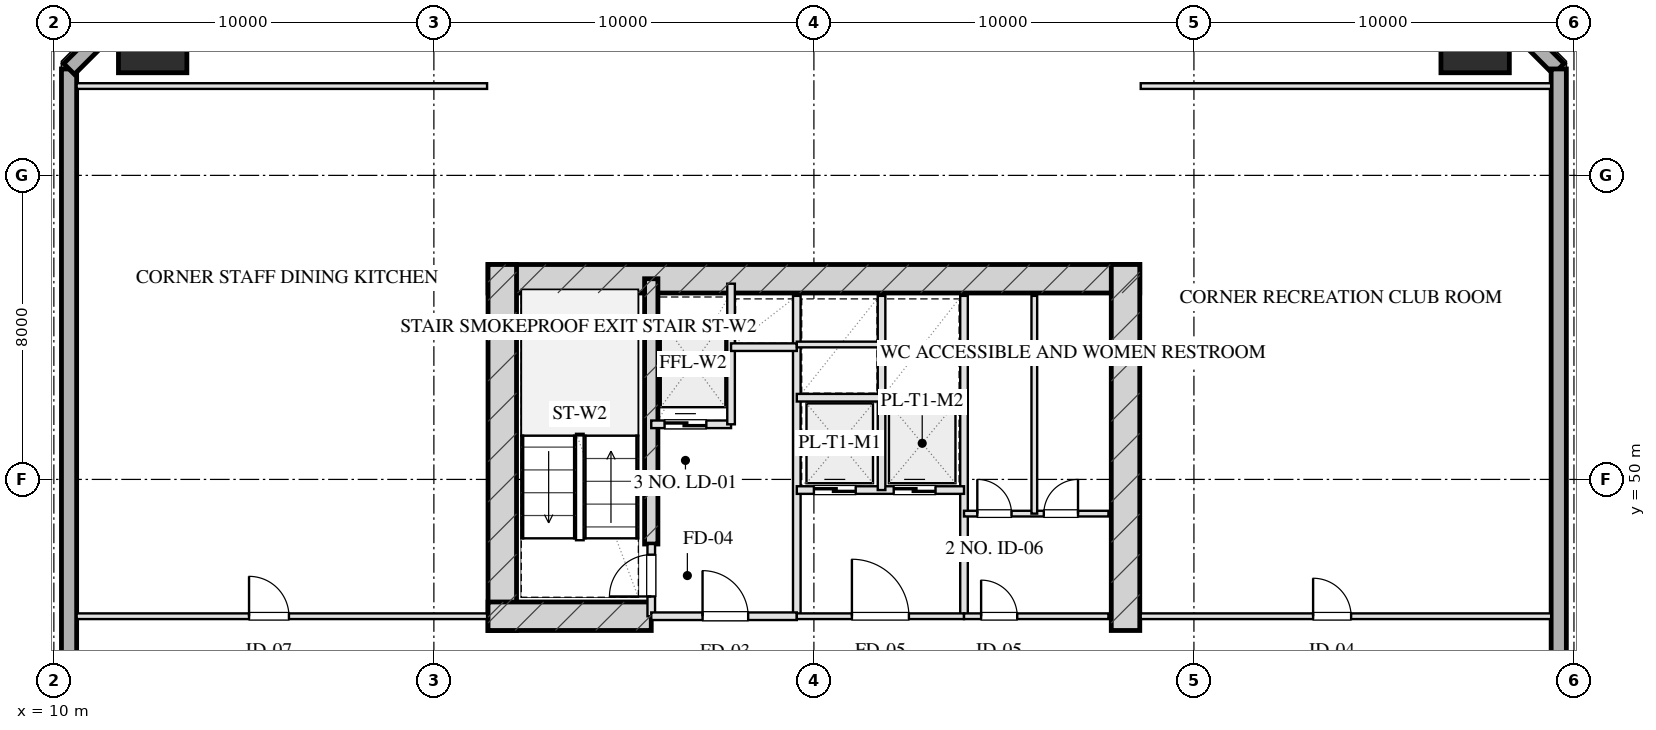
"""IFC4 building model, lengths in metres.
Left out: names, types, materials, properties, quantities, classifications, styles, units other than length and angle.
Written with IfcOpenShell. Run it as: python <this file> out.ifc"""

import sys

from ifc_helpers import new_model, si_unit, direction, frame, frame_2d, origin, origin_2d, place, context, subcontext, project, spatial, rectangle, hollow_rectangle, extrude, element, fill, save


model = new_model("IFC4")
c1 = context("Model", 3, precision=1e-05, world=origin(), true_north=direction((0.0, 1.0)))
c2 = subcontext(c1, "Body", "Model", "MODEL_VIEW")
j1 = project(units=[si_unit("LENGTHUNIT", "METRE"), si_unit("PLANEANGLEUNIT", "RADIAN")], contexts=[c1])
p1 = place(None, origin())
s1 = spatial("IfcSite", under=j1, at=p1, CompositionType="ELEMENT")
p2 = place(p1, origin())
s2 = spatial("IfcBuilding", under=s1, at=p2, CompositionType="ELEMENT")
p3 = place(p2, frame((0.0, 0.0, 64.4)))
s3 = spatial("IfcBuildingStorey", under=s2, at=p3, CompositionType="ELEMENT", Elevation=64.4)
p4 = place(p3, frame((21.425, 55.28, 0.0), z_axis=(0.0, 0.0, 1.0), x_axis=(1.0, 0.0, 0.0)))
e1 = element("IfcWall", 1, at=p4, inside=s3, PredefinedType="SHEAR", context=c2, shape_type="SweptSolid", body=[
    extrude(rectangle(XDim=17.15, YDim=0.75, at=frame_2d((8.575, 0.0))), origin(), (0.0, 0.0, 1.0), 3.45),
])
for number, where, z_axis, x_axis in (
    (2, (21.8, 46.025, 0.0), (0.0, 0.0, 1.0), (0.0, 1.0, 0.0)),
    (3, (38.2, 46.025, 0.0), (0.0, 0.0, 1.0), (0.0, 1.0, 0.0)),
):
    element("IfcWall", number, at=place(p3, frame(where, z_axis=z_axis, x_axis=x_axis)), inside=s3, PredefinedType="SHEAR", context=c2, shape_type="SweptSolid", body=[
        extrude(rectangle(XDim=9.63, YDim=0.75, at=frame_2d((4.815, 0.0))), origin(), (0.0, 0.0, 1.0), 3.45),
    ])
p5 = place(p3, frame((25.72, 48.3, 0.0), z_axis=(0.0, 0.0, 1.0), x_axis=(0.0, 1.0, 0.0)))
e4 = element("IfcWall", 4, at=p5, inside=s3, PredefinedType="SHEAR", context=c2, shape_type="SweptSolid", body=[
    extrude(rectangle(XDim=6.98, YDim=0.35, at=frame_2d((3.49, 0.0))), origin(), (0.0, 0.0, 1.0), 3.45),
])
p6 = place(p3, frame((21.425, 46.4, 0.0), z_axis=(0.0, 0.0, 1.0), x_axis=(1.0, 0.0, 0.0)))
e5 = element("IfcWall", 5, at=p6, inside=s3, PredefinedType="SHEAR", context=c2, shape_type="SweptSolid", body=[
    extrude(rectangle(XDim=4.295, YDim=0.75, at=frame_2d((2.147, 0.0))), origin(), (0.0, 0.0, 1.0), 3.45),
])
for number, where, z_axis, x_axis in (
    (6, (47.4, 61.6, 0.0), (0.0, 0.0, 1.0), (1.0, 0.0, 0.0)),
    (7, (12.6, 61.6, 0.0), (0.0, 0.0, 1.0), (1.0, 0.0, 0.0)),
):
    element("IfcColumn", number, at=place(p3, frame(where, z_axis=z_axis, x_axis=x_axis)), inside=s3, PredefinedType="COLUMN", context=c2, shape_type="SweptSolid", body=[
        extrude(hollow_rectangle(XDim=1.8, YDim=1.8, WallThickness=0.06, at=origin_2d()), origin(), (0.0, 0.0, 1.0), 3.451),
    ])
p7 = place(p3, frame((10.4, 7.2, 0.0), z_axis=(0.0, 0.0, 1.0), x_axis=(0.0, 1.0, 0.0)))
e8 = element("IfcWall", 8, at=p7, inside=s3, PredefinedType="SOLIDWALL", context=c2, shape_type="SweptSolid", body=[
    extrude(rectangle(XDim=53.6, YDim=0.4, at=frame_2d((26.8, 0.0))), origin(), (0.0, 0.0, 1.0), 2.61),
])
p8 = place(p7, frame((19.15, 0.0, 0.75)))
e9 = element("IfcOpeningElement", 9, at=p8, cuts=e8, PredefinedType="OPENING", context=c2, shape_type="SweptSolid", body=[
    extrude(rectangle(XDim=2.5, YDim=1.46, at=frame_2d((1.25, 0.73))), frame((0.0, 0.21, 0.0), z_axis=(0.0, -1.0, 0.0), x_axis=(1.0, 0.0, 0.0)), (0.0, 0.0, 1.0), 0.42),
])
p9 = place(p7, frame((31.95, 0.0, 0.75)))
e10 = element("IfcOpeningElement", 10, at=p9, cuts=e8, PredefinedType="OPENING", context=c2, shape_type="SweptSolid", body=[
    extrude(rectangle(XDim=2.5, YDim=1.46, at=frame_2d((1.25, 0.73))), frame((0.0, 0.21, 0.0), z_axis=(0.0, -1.0, 0.0), x_axis=(1.0, 0.0, 0.0)), (0.0, 0.0, 1.0), 0.42),
])
for number, where, z_axis, x_axis in (
    (11, (10.4, 60.8, 0.0), (0.0, 0.0, 1.0), (0.707, 0.707, 0.0)),
    (12, (46.6, 63.8, 0.0), (0.0, 0.0, 1.0), (0.707, -0.707, 0.0)),
):
    element("IfcWall", number, at=place(p3, frame(where, z_axis=z_axis, x_axis=x_axis)), inside=s3, PredefinedType="SOLIDWALL", context=c2, shape_type="SweptSolid", body=[
        extrude(rectangle(XDim=4.243, YDim=0.4, at=frame_2d((2.121, 0.0))), origin(), (0.0, 0.0, 1.0), 2.61),
    ])
p10 = place(p3, frame((49.6, 60.8, 0.0), z_axis=(0.0, 0.0, 1.0), x_axis=(0.0, -1.0, 0.0)))
e13 = element("IfcWall", 13, at=p10, inside=s3, PredefinedType="SOLIDWALL", context=c2, shape_type="SweptSolid", body=[
    extrude(rectangle(XDim=53.6, YDim=0.4, at=frame_2d((26.8, 0.0))), origin(), (0.0, 0.0, 1.0), 2.61),
])
p11 = place(p10, frame((28.15, 0.0, 0.75)))
e14 = element("IfcOpeningElement", 14, at=p11, cuts=e13, PredefinedType="OPENING", context=c2, shape_type="SweptSolid", body=[
    extrude(rectangle(XDim=2.5, YDim=1.46, at=frame_2d((1.25, 0.73))), frame((0.0, 0.21, 0.0), z_axis=(0.0, -1.0, 0.0), x_axis=(1.0, 0.0, 0.0)), (0.0, 0.0, 1.0), 0.42),
])
p12 = place(p10, frame((22.95, 0.0, 0.75)))
e15 = element("IfcOpeningElement", 15, at=p12, cuts=e13, PredefinedType="OPENING", context=c2, shape_type="SweptSolid", body=[
    extrude(rectangle(XDim=2.5, YDim=1.46, at=frame_2d((1.25, 0.73))), frame((0.0, 0.21, 0.0), z_axis=(0.0, -1.0, 0.0), x_axis=(1.0, 0.0, 0.0)), (0.0, 0.0, 1.0), 0.42),
])
p13 = place(p3, frame((25.72, 46.4, 0.0), z_axis=(0.0, 0.0, 1.0), x_axis=(0.0, 1.0, 0.0)))
e16 = element("IfcWall", 16, at=p13, inside=s3, PredefinedType="PARTITIONING", context=c2, shape_type="SweptSolid", body=[
    extrude(rectangle(XDim=1.9, YDim=0.2, at=frame_2d((0.95, 0.0))), origin(), (0.0, 0.0, 1.0), 3.175),
])
p14 = place(p13, frame((0.52, 0.0, 0.0)))
e17 = element("IfcOpeningElement", 17, at=p14, cuts=e16, PredefinedType="OPENING", context=c2, shape_type="SweptSolid", body=[
    extrude(rectangle(XDim=1.1, YDim=2.05, at=frame_2d((0.55, 1.025))), frame((0.0, 0.11, 0.0), z_axis=(0.0, -1.0, 0.0), x_axis=(1.0, 0.0, 0.0)), (0.0, 0.0, 1.0), 0.22),
])
p15 = place(p3, frame((29.55, 46.4, 0.0), z_axis=(0.0, 0.0, 1.0), x_axis=(0.0, 1.0, 0.0)))
e18 = element("IfcWall", 18, at=p15, inside=s3, PredefinedType="PARTITIONING", context=c2, shape_type="SweptSolid", body=[
    extrude(rectangle(XDim=8.43, YDim=0.2, at=frame_2d((4.215, 0.0))), origin(), (0.0, 0.0, 1.0), 3.175),
])
p16 = place(p3, frame((25.72, 46.4, 0.0), z_axis=(0.0, 0.0, 1.0), x_axis=(1.0, 0.0, 0.0)))
e19 = element("IfcWall", 19, at=p16, inside=s3, PredefinedType="PARTITIONING", context=c2, shape_type="SweptSolid", body=[
    extrude(rectangle(XDim=3.83, YDim=0.2, at=frame_2d((1.915, 0.0))), origin(), (0.0, 0.0, 1.0), 3.175),
])
p17 = place(p16, frame((1.35, 0.0, 0.0)))
e20 = element("IfcOpeningElement", 20, at=p17, cuts=e19, PredefinedType="OPENING", context=c2, shape_type="SweptSolid", body=[
    extrude(rectangle(XDim=1.2, YDim=2.05, at=frame_2d((0.6, 1.025))), frame((0.0, 0.11, 0.0), z_axis=(0.0, -1.0, 0.0), x_axis=(1.0, 0.0, 0.0)), (0.0, 0.0, 1.0), 0.22),
])
p18 = place(p3, frame((25.72, 51.45, 0.0), z_axis=(0.0, 0.0, 1.0), x_axis=(1.0, 0.0, 0.0)))
e21 = element("IfcWall", 21, at=p18, inside=s3, PredefinedType="PARTITIONING", context=c2, shape_type="SweptSolid", body=[
    extrude(rectangle(XDim=2.1, YDim=0.2, at=frame_2d((1.05, 0.0))), origin(), (0.0, 0.0, 1.0), 3.175),
])
p19 = place(p18, frame((0.35, 0.0, 0.0)))
e22 = element("IfcOpeningElement", 22, at=p19, cuts=e21, PredefinedType="OPENING", context=c2, shape_type="SweptSolid", body=[
    extrude(rectangle(XDim=1.1, YDim=2.05, at=frame_2d((0.55, 1.025))), frame((0.0, 0.11, 0.0), z_axis=(0.0, -1.0, 0.0), x_axis=(1.0, 0.0, 0.0)), (0.0, 0.0, 1.0), 0.22),
])
p20 = place(p3, frame((27.82, 51.45, 0.0), z_axis=(0.0, 0.0, 1.0), x_axis=(0.0, 1.0, 0.0)))
e23 = element("IfcWall", 23, at=p20, inside=s3, PredefinedType="PARTITIONING", context=c2, shape_type="SweptSolid", body=[
    extrude(rectangle(XDim=3.7, YDim=0.2, at=frame_2d((1.85, 0.0))), origin(), (0.0, 0.0, 1.0), 3.175),
])
p21 = place(p3, frame((27.82, 53.48, 0.0), z_axis=(0.0, 0.0, 1.0), x_axis=(1.0, 0.0, 0.0)))
e24 = element("IfcWall", 24, at=p21, inside=s3, PredefinedType="PARTITIONING", context=c2, shape_type="SweptSolid", body=[
    extrude(rectangle(XDim=1.73, YDim=0.2, at=frame_2d((0.865, 0.0))), origin(), (0.0, 0.0, 1.0), 3.175),
])
p22 = place(p3, frame((33.95, 46.4, 0.0), z_axis=(0.0, 0.0, 1.0), x_axis=(0.0, 1.0, 0.0)))
e25 = element("IfcWall", 25, at=p22, inside=s3, PredefinedType="PARTITIONING", context=c2, shape_type="SweptSolid", body=[
    extrude(rectangle(XDim=8.43, YDim=0.2, at=frame_2d((4.215, 0.0))), origin(), (0.0, 0.0, 1.0), 3.175),
])
p23 = place(p3, frame((29.55, 46.4, 0.0), z_axis=(0.0, 0.0, 1.0), x_axis=(1.0, 0.0, 0.0)))
e26 = element("IfcWall", 26, at=p23, inside=s3, PredefinedType="PARTITIONING", context=c2, shape_type="SweptSolid", body=[
    extrude(rectangle(XDim=4.4, YDim=0.15, at=frame_2d((2.2, 0.0))), origin(), (0.0, 0.0, 1.0), 3.175),
])
p24 = place(p23, frame((1.45, 0.0, 0.0)))
e27 = element("IfcOpeningElement", 27, at=p24, cuts=e26, PredefinedType="OPENING", context=c2, shape_type="SweptSolid", body=[
    extrude(rectangle(XDim=1.5, YDim=2.05, at=frame_2d((0.75, 1.025))), frame((0.0, 0.085, 0.0), z_axis=(0.0, -1.0, 0.0), x_axis=(1.0, 0.0, 0.0)), (0.0, 0.0, 1.0), 0.17),
])
p25 = place(p3, frame((29.55, 49.72, 0.0), z_axis=(0.0, 0.0, 1.0), x_axis=(1.0, 0.0, 0.0)))
e28 = element("IfcWall", 28, at=p25, inside=s3, PredefinedType="PARTITIONING", context=c2, shape_type="SweptSolid", body=[
    extrude(rectangle(XDim=4.4, YDim=0.2, at=frame_2d((2.2, 0.0))), origin(), (0.0, 0.0, 1.0), 3.175),
])
p26 = place(p25, frame((0.45, 0.0, 0.0)))
e29 = element("IfcOpeningElement", 29, at=p26, cuts=e28, PredefinedType="OPENING", context=c2, shape_type="SweptSolid", body=[
    extrude(rectangle(XDim=1.1, YDim=2.05, at=frame_2d((0.55, 1.025))), frame((0.0, 0.11, 0.0), z_axis=(0.0, -1.0, 0.0), x_axis=(1.0, 0.0, 0.0)), (0.0, 0.0, 1.0), 0.22),
])
p27 = place(p25, frame((2.55, 0.0, 0.0)))
e30 = element("IfcOpeningElement", 30, at=p27, cuts=e28, PredefinedType="OPENING", context=c2, shape_type="SweptSolid", body=[
    extrude(rectangle(XDim=1.1, YDim=2.05, at=frame_2d((0.55, 1.025))), frame((0.0, 0.11, 0.0), z_axis=(0.0, -1.0, 0.0), x_axis=(1.0, 0.0, 0.0)), (0.0, 0.0, 1.0), 0.22),
])
p28 = place(p3, frame((31.78, 49.72, 0.0), z_axis=(0.0, 0.0, 1.0), x_axis=(0.0, 1.0, 0.0)))
e31 = element("IfcWall", 31, at=p28, inside=s3, PredefinedType="PARTITIONING", context=c2, shape_type="SweptSolid", body=[
    extrude(rectangle(XDim=5.11, YDim=0.2, at=frame_2d((2.555, 0.0))), origin(), (0.0, 0.0, 1.0), 3.175),
])
p29 = place(p3, frame((29.55, 52.15, 0.0), z_axis=(0.0, 0.0, 1.0), x_axis=(1.0, 0.0, 0.0)))
e32 = element("IfcWall", 32, at=p29, inside=s3, PredefinedType="PARTITIONING", context=c2, shape_type="SweptSolid", body=[
    extrude(rectangle(XDim=4.4, YDim=0.2, at=frame_2d((2.2, 0.0))), origin(), (0.0, 0.0, 1.0), 3.175),
])
p30 = place(p3, frame((29.55, 53.55, 0.0), z_axis=(0.0, 0.0, 1.0), x_axis=(1.0, 0.0, 0.0)))
e33 = element("IfcWall", 33, at=p30, inside=s3, PredefinedType="PARTITIONING", context=c2, shape_type="SweptSolid", body=[
    extrude(rectangle(XDim=2.23, YDim=0.15, at=frame_2d((1.115, 0.0))), origin(), (0.0, 0.0, 1.0), 3.175),
])
p31 = place(p3, frame((33.95, 46.4, 0.0), z_axis=(0.0, 0.0, 1.0), x_axis=(1.0, 0.0, 0.0)))
e34 = element("IfcWall", 34, at=p31, inside=s3, PredefinedType="PARTITIONING", context=c2, shape_type="SweptSolid", body=[
    extrude(rectangle(XDim=3.8, YDim=0.15, at=frame_2d((1.9, 0.0))), origin(), (0.0, 0.0, 1.0), 3.175),
])
p32 = place(p31, frame((0.45, 0.0, 0.0)))
e35 = element("IfcOpeningElement", 35, at=p32, cuts=e34, PredefinedType="OPENING", context=c2, shape_type="SweptSolid", body=[
    extrude(rectangle(XDim=0.95, YDim=2.05, at=frame_2d((0.475, 1.025))), frame((0.0, 0.085, 0.0), z_axis=(0.0, -1.0, 0.0), x_axis=(1.0, 0.0, 0.0)), (0.0, 0.0, 1.0), 0.17),
])
p33 = place(p3, frame((33.95, 49.1, 0.0), z_axis=(0.0, 0.0, 1.0), x_axis=(1.0, 0.0, 0.0)))
e36 = element("IfcWall", 36, at=p33, inside=s3, PredefinedType="PARTITIONING", context=c2, shape_type="SweptSolid", body=[
    extrude(rectangle(XDim=3.8, YDim=0.15, at=frame_2d((1.9, 0.0))), origin(), (0.0, 0.0, 1.0), 3.175),
])
p34 = place(p33, frame((0.35, 0.0, 0.0)))
e37 = element("IfcOpeningElement", 37, at=p34, cuts=e36, PredefinedType="OPENING", context=c2, shape_type="SweptSolid", body=[
    extrude(rectangle(XDim=0.9, YDim=2.05, at=frame_2d((0.45, 1.025))), frame((0.0, 0.085, 0.0), z_axis=(0.0, -1.0, 0.0), x_axis=(1.0, 0.0, 0.0)), (0.0, 0.0, 1.0), 0.17),
])
p35 = place(p33, frame((2.1, 0.0, 0.0)))
e38 = element("IfcOpeningElement", 38, at=p35, cuts=e36, PredefinedType="OPENING", context=c2, shape_type="SweptSolid", body=[
    extrude(rectangle(XDim=0.9, YDim=2.05, at=frame_2d((0.45, 1.025))), frame((0.0, 0.085, 0.0), z_axis=(0.0, -1.0, 0.0), x_axis=(1.0, 0.0, 0.0)), (0.0, 0.0, 1.0), 0.17),
])
p36 = place(p3, frame((35.8, 49.1, 0.0), z_axis=(0.0, 0.0, 1.0), x_axis=(0.0, 1.0, 0.0)))
e39 = element("IfcWall", 39, at=p36, inside=s3, PredefinedType="PARTITIONING", context=c2, shape_type="SweptSolid", body=[
    extrude(rectangle(XDim=5.73, YDim=0.15, at=frame_2d((2.865, 0.0))), origin(), (0.0, 0.0, 1.0), 3.175),
])
p37 = place(p3, frame((10.6, 60.35, 0.0), z_axis=(0.0, 0.0, 1.0), x_axis=(1.0, 0.0, 0.0)))
e40 = element("IfcWall", 40, at=p37, inside=s3, PredefinedType="PARTITIONING", context=c2, shape_type="SweptSolid", body=[
    extrude(rectangle(XDim=10.8, YDim=0.15, at=frame_2d((5.4, 0.0))), origin(), (0.0, 0.0, 1.0), 3.175),
])
p38 = place(p3, frame((10.6, 46.4, 0.0), z_axis=(0.0, 0.0, 1.0), x_axis=(1.0, 0.0, 0.0)))
e41 = element("IfcWall", 41, at=p38, inside=s3, PredefinedType="PARTITIONING", context=c2, shape_type="SweptSolid", body=[
    extrude(rectangle(XDim=10.8, YDim=0.15, at=frame_2d((5.4, 0.0))), origin(), (0.0, 0.0, 1.0), 3.175),
])
p39 = place(p38, frame((4.536, 0.0, 0.0)))
e42 = element("IfcOpeningElement", 42, at=p39, cuts=e41, PredefinedType="OPENING", context=c2, shape_type="SweptSolid", body=[
    extrude(rectangle(XDim=1.05, YDim=2.05, at=frame_2d((0.525, 1.025))), frame((0.0, 0.085, 0.0), z_axis=(0.0, -1.0, 0.0), x_axis=(1.0, 0.0, 0.0)), (0.0, 0.0, 1.0), 0.17),
])
p40 = place(p3, frame((38.6, 60.35, 0.0), z_axis=(0.0, 0.0, 1.0), x_axis=(1.0, 0.0, 0.0)))
e43 = element("IfcWall", 43, at=p40, inside=s3, PredefinedType="PARTITIONING", context=c2, shape_type="SweptSolid", body=[
    extrude(rectangle(XDim=10.8, YDim=0.15, at=frame_2d((5.4, 0.0))), origin(), (0.0, 0.0, 1.0), 3.175),
])
p41 = place(p3, frame((38.6, 46.4, 0.0), z_axis=(0.0, 0.0, 1.0), x_axis=(1.0, 0.0, 0.0)))
e44 = element("IfcWall", 44, at=p41, inside=s3, PredefinedType="PARTITIONING", context=c2, shape_type="SweptSolid", body=[
    extrude(rectangle(XDim=10.8, YDim=0.15, at=frame_2d((5.4, 0.0))), origin(), (0.0, 0.0, 1.0), 3.175),
])
p42 = place(p41, frame((4.536, 0.0, 0.0)))
e45 = element("IfcOpeningElement", 45, at=p42, cuts=e44, PredefinedType="OPENING", context=c2, shape_type="SweptSolid", body=[
    extrude(rectangle(XDim=1.0, YDim=2.05, at=frame_2d((0.5, 1.025))), frame((0.0, 0.085, 0.0), z_axis=(0.0, -1.0, 0.0), x_axis=(1.0, 0.0, 0.0)), (0.0, 0.0, 1.0), 0.17),
])
p43 = place(p14, origin())
e46 = element("IfcDoor", 46, at=p43, inside=s3, OperationType="SINGLE_SWING_LEFT", PredefinedType="DOOR", context=c2, shape_type="SweptSolid", body=[
    extrude(rectangle(XDim=1.1, YDim=2.05, at=frame_2d((0.55, 1.025))), frame((0.0, 0.025, 0.0), z_axis=(0.0, -1.0, 0.0), x_axis=(1.0, 0.0, 0.0)), (0.0, 0.0, 1.0), 0.05),
])
fill(e17, e46)
p44 = place(p17, origin())
e47 = element("IfcDoor", 47, at=p44, inside=s3, OperationType="SINGLE_SWING_LEFT", PredefinedType="DOOR", context=c2, shape_type="SweptSolid", body=[
    extrude(rectangle(XDim=1.2, YDim=2.05, at=frame_2d((0.6, 1.025))), frame((0.0, 0.025, 0.0), z_axis=(0.0, -1.0, 0.0), x_axis=(1.0, 0.0, 0.0)), (0.0, 0.0, 1.0), 0.05),
])
fill(e20, e47)
p45 = place(p19, origin())
e48 = element("IfcDoor", 48, at=p45, inside=s3, OperationType="DOUBLE_DOOR_SLIDING", PredefinedType="DOOR", context=c2, shape_type="SweptSolid", body=[
    extrude(rectangle(XDim=1.1, YDim=2.05, at=frame_2d((0.55, 1.025))), frame((0.0, 0.025, 0.0), z_axis=(0.0, -1.0, 0.0), x_axis=(1.0, 0.0, 0.0)), (0.0, 0.0, 1.0), 0.05),
])
fill(e22, e48)
p46 = place(p24, origin())
e49 = element("IfcDoor", 49, at=p46, inside=s3, OperationType="SINGLE_SWING_LEFT", PredefinedType="DOOR", context=c2, shape_type="SweptSolid", body=[
    extrude(rectangle(XDim=1.5, YDim=2.05, at=frame_2d((0.75, 1.025))), frame((0.0, 0.025, 0.0), z_axis=(0.0, -1.0, 0.0), x_axis=(1.0, 0.0, 0.0)), (0.0, 0.0, 1.0), 0.05),
])
fill(e27, e49)
p47 = place(p26, origin())
e50 = element("IfcDoor", 50, at=p47, inside=s3, OperationType="DOUBLE_DOOR_SLIDING", PredefinedType="DOOR", context=c2, shape_type="SweptSolid", body=[
    extrude(rectangle(XDim=1.1, YDim=2.05, at=frame_2d((0.55, 1.025))), frame((0.0, 0.025, 0.0), z_axis=(0.0, -1.0, 0.0), x_axis=(1.0, 0.0, 0.0)), (0.0, 0.0, 1.0), 0.05),
])
fill(e29, e50)
p48 = place(p27, origin())
e51 = element("IfcDoor", 51, at=p48, inside=s3, OperationType="DOUBLE_DOOR_SLIDING", PredefinedType="DOOR", context=c2, shape_type="SweptSolid", body=[
    extrude(rectangle(XDim=1.1, YDim=2.05, at=frame_2d((0.55, 1.025))), frame((0.0, 0.025, 0.0), z_axis=(0.0, -1.0, 0.0), x_axis=(1.0, 0.0, 0.0)), (0.0, 0.0, 1.0), 0.05),
])
fill(e30, e51)
p49 = place(p32, origin())
e52 = element("IfcDoor", 52, at=p49, inside=s3, OperationType="SINGLE_SWING_LEFT", PredefinedType="DOOR", context=c2, shape_type="SweptSolid", body=[
    extrude(rectangle(XDim=0.95, YDim=2.05, at=frame_2d((0.475, 1.025))), frame((0.0, 0.025, 0.0), z_axis=(0.0, -1.0, 0.0), x_axis=(1.0, 0.0, 0.0)), (0.0, 0.0, 1.0), 0.05),
])
fill(e35, e52)
p50 = place(p34, origin())
e53 = element("IfcDoor", 53, at=p50, inside=s3, OperationType="SINGLE_SWING_LEFT", PredefinedType="DOOR", context=c2, shape_type="SweptSolid", body=[
    extrude(rectangle(XDim=0.9, YDim=2.05, at=frame_2d((0.45, 1.025))), frame((0.0, 0.025, 0.0), z_axis=(0.0, -1.0, 0.0), x_axis=(1.0, 0.0, 0.0)), (0.0, 0.0, 1.0), 0.05),
])
fill(e37, e53)
p51 = place(p35, origin())
e54 = element("IfcDoor", 54, at=p51, inside=s3, OperationType="SINGLE_SWING_RIGHT", PredefinedType="DOOR", context=c2, shape_type="SweptSolid", body=[
    extrude(rectangle(XDim=0.9, YDim=2.05, at=frame_2d((0.45, 1.025))), frame((0.0, 0.025, 0.0), z_axis=(0.0, -1.0, 0.0), x_axis=(1.0, 0.0, 0.0)), (0.0, 0.0, 1.0), 0.05),
])
fill(e38, e54)
p52 = place(p39, origin())
e55 = element("IfcDoor", 55, at=p52, inside=s3, OperationType="SINGLE_SWING_LEFT", PredefinedType="DOOR", context=c2, shape_type="SweptSolid", body=[
    extrude(rectangle(XDim=1.05, YDim=2.05, at=frame_2d((0.525, 1.025))), frame((0.0, 0.025, 0.0), z_axis=(0.0, -1.0, 0.0), x_axis=(1.0, 0.0, 0.0)), (0.0, 0.0, 1.0), 0.05),
])
fill(e42, e55)
p53 = place(p42, origin())
e56 = element("IfcDoor", 56, at=p53, inside=s3, OperationType="SINGLE_SWING_LEFT", PredefinedType="DOOR", context=c2, shape_type="SweptSolid", body=[
    extrude(rectangle(XDim=1.0, YDim=2.05, at=frame_2d((0.5, 1.025))), frame((0.0, 0.025, 0.0), z_axis=(0.0, -1.0, 0.0), x_axis=(1.0, 0.0, 0.0)), (0.0, 0.0, 1.0), 0.05),
])
fill(e45, e56)
save(model, sys.argv[1])
